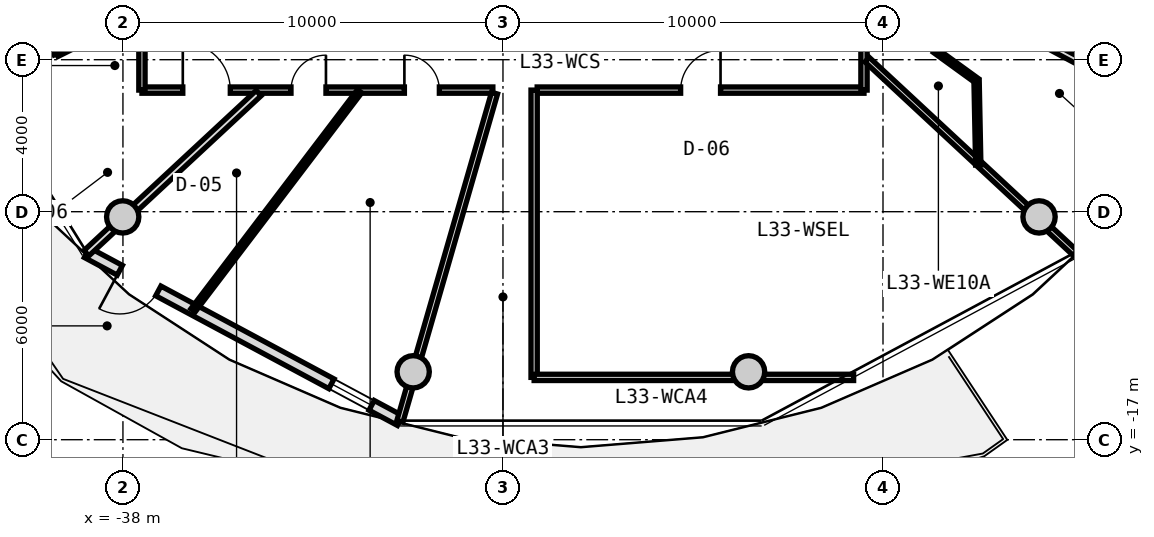
"""IFC4 building model, lengths in metres.
Left out: names, types, materials, properties, quantities, classifications, styles, units other than length and angle.
Written with IfcOpenShell. Run it as: python <this file> out.ifc"""

import sys

from ifc_helpers import new_model, si_unit, direction, frame, frame_2d, origin, origin_2d, place, context, subcontext, project, spatial, rectangle, circle, extrude, source, transform, mapped, element, fill, save


model = new_model("IFC4")
c1 = context("Model", 3, precision=1e-05, world=origin(), true_north=direction((0.0, 1.0)))
c2 = subcontext(c1, "Body", "Model", "MODEL_VIEW")
j1 = project(units=[si_unit("LENGTHUNIT", "METRE"), si_unit("PLANEANGLEUNIT", "RADIAN")], contexts=[c1])
p1 = place(None, origin())
s1 = spatial("IfcSite", under=j1, at=p1, CompositionType="ELEMENT")
p2 = place(p1, origin())
s2 = spatial("IfcBuilding", under=s1, at=p2, CompositionType="ELEMENT")
p3 = place(p2, frame((0.0, 0.0, 108.45)))
s3 = spatial("IfcBuildingStorey", under=s2, at=p3, CompositionType="ELEMENT", Elevation=108.45)
m1 = source(origin(), c2, "Body", "SweptSolid", [
    extrude(circle(Radius=0.425, at=origin_2d()), origin(), (0.0, 0.0, 1.0), 3.05),
])
for number, where, z_axis, x_axis in (
    (1, (-38.006, -11.137, 0.0), (0.0, 0.0, 1.0), (1.0, 0.0, 0.0)),
    (2, (-30.363, -15.213, 0.0), (0.0, 0.0, 1.0), (1.0, 0.0, 0.0)),
    (3, (-21.537, -15.213, 0.0), (0.0, 0.0, 1.0), (1.0, 0.0, 0.0)),
    (4, (-13.894, -11.137, 0.0), (0.0, 0.0, 1.0), (1.0, 0.0, 0.0)),
):
    element("IfcColumn", number, at=place(p3, frame(where, z_axis=z_axis, x_axis=x_axis)), inside=s3, PredefinedType="COLUMN", context=c2, shape_type="MappedRepresentation", body=[
        mapped(m1, transform((0.0, 0.0, 0.0), x_axis=(1.0, 0.0, 0.0), y_axis=(0.0, 1.0, 0.0), z_axis=(0.0, 0.0, 1.0), scale=1.0)),
    ])
m2 = source(origin(), c2, "Body", "SweptSolid", [
    extrude(rectangle(XDim=9.351, YDim=0.29, at=frame_2d((4.675, 0.0))), origin(), (0.0, 0.0, 1.0), 2.79),
])
p4 = place(p3, frame((-30.707, -16.498, 0.0), z_axis=(0.0, 0.0, 1.0), x_axis=(-0.881184411073, 0.472772708267, 0.0)))
e5 = element("IfcWall", 5, at=p4, inside=s3, PredefinedType="SOLIDWALL", context=c2, shape_type="MappedRepresentation", body=[
    mapped(m2, transform((0.0, 0.0, 0.0), x_axis=(1.0, 0.0, 0.0), y_axis=(0.0, 1.0, 0.0), z_axis=(0.0, 0.0, 1.0), scale=1.0)),
])
p5 = place(p4, frame((7.22, 0.0, 0.0)))
e6 = element("IfcOpeningElement", 6, at=p5, cuts=e5, PredefinedType="OPENING", context=c2, shape_type="SweptSolid", body=[
    extrude(rectangle(XDim=1.15, YDim=2.25, at=frame_2d((0.575, 1.125))), frame((0.0, 0.155, 0.0), z_axis=(0.0, -1.0, 0.0), x_axis=(1.0, 0.0, 0.0)), (0.0, 0.0, 1.0), 0.31),
])
p6 = place(p4, frame((0.85, 0.0, 0.85)))
e7 = element("IfcOpeningElement", 7, at=p6, cuts=e5, PredefinedType="OPENING", context=c2, shape_type="SweptSolid", body=[
    extrude(rectangle(XDim=1.2, YDim=1.5, at=frame_2d((0.6, 0.75))), frame((0.0, 0.155, 0.0), z_axis=(0.0, -1.0, 0.0), x_axis=(1.0, 0.0, 0.0)), (0.0, 0.0, 1.0), 0.31),
])
m3 = source(origin(), c2, "Body", "SweptSolid", [
    extrude(rectangle(XDim=8.6, YDim=0.165, at=frame_2d((4.3, 0.0))), origin(), (0.0, 0.0, 1.0), 2.775),
])
p7 = place(p3, frame((-18.5, -7.8, 0.0), z_axis=(0.0, 0.0, 1.0), x_axis=(-1.0, 0.0, 0.0)))
e8 = element("IfcWall", 8, at=p7, inside=s3, PredefinedType="PARTITIONING", context=c2, shape_type="MappedRepresentation", body=[
    mapped(m3, transform((0.0, 0.0, 0.0), x_axis=(1.0, 0.0, 0.0), y_axis=(0.0, 1.0, 0.0), z_axis=(0.0, 0.0, 1.0), scale=1.0)),
])
p8 = place(p7, frame((3.775, 0.0, 0.0)))
e9 = element("IfcOpeningElement", 9, at=p8, cuts=e8, PredefinedType="OPENING", context=c2, shape_type="SweptSolid", body=[
    extrude(rectangle(XDim=1.05, YDim=2.15, at=frame_2d((0.525, 1.075))), frame((0.0, 0.093, 0.0), z_axis=(0.0, -1.0, 0.0), x_axis=(1.0, 0.0, 0.0)), (0.0, 0.0, 1.0), 0.185),
])
m4 = source(origin(), c2, "Body", "SweptSolid", [
    extrude(rectangle(XDim=9.234, YDim=0.165, at=frame_2d((4.617, 0.0))), origin(), (0.0, 0.0, 1.0), 2.775),
])
p9 = place(p3, frame((-28.266, -7.8, 0.0), z_axis=(0.0, 0.0, 1.0), x_axis=(-1.0, 0.0, 0.0)))
e10 = element("IfcWall", 10, at=p9, inside=s3, PredefinedType="PARTITIONING", context=c2, shape_type="MappedRepresentation", body=[
    mapped(m4, transform((0.0, 0.0, 0.0), x_axis=(1.0, 0.0, 0.0), y_axis=(0.0, 1.0, 0.0), z_axis=(0.0, 0.0, 1.0), scale=1.0)),
])
p10 = place(p9, frame((6.909, 0.0, 0.0)))
e11 = element("IfcOpeningElement", 11, at=p10, cuts=e10, PredefinedType="OPENING", context=c2, shape_type="SweptSolid", body=[
    extrude(rectangle(XDim=1.25, YDim=2.2, at=frame_2d((0.625, 1.1))), frame((0.0, 0.093, 0.0), z_axis=(0.0, -1.0, 0.0), x_axis=(1.0, 0.0, 0.0)), (0.0, 0.0, 1.0), 0.185),
])
p11 = place(p9, frame((4.392, 0.0, 0.0)))
e12 = element("IfcOpeningElement", 12, at=p11, cuts=e10, PredefinedType="OPENING", context=c2, shape_type="SweptSolid", body=[
    extrude(rectangle(XDim=0.92, YDim=2.1, at=frame_2d((0.46, 1.05))), frame((0.0, 0.093, 0.0), z_axis=(0.0, -1.0, 0.0), x_axis=(1.0, 0.0, 0.0)), (0.0, 0.0, 1.0), 0.185),
])
p12 = place(p9, frame((1.408, 0.0, 0.0)))
e13 = element("IfcOpeningElement", 13, at=p12, cuts=e10, PredefinedType="OPENING", context=c2, shape_type="SweptSolid", body=[
    extrude(rectangle(XDim=0.92, YDim=2.1, at=frame_2d((0.46, 1.05))), frame((0.0, 0.093, 0.0), z_axis=(0.0, -1.0, 0.0), x_axis=(1.0, 0.0, 0.0)), (0.0, 0.0, 1.0), 0.185),
])
m5 = source(origin(), c2, "Body", "SweptSolid", [
    extrude(rectangle(XDim=15.6, YDim=0.165, at=frame_2d((7.8, 0.0))), origin(), (0.0, 0.0, 1.0), 2.775),
])
p13 = place(p3, frame((-37.5, -7.8, 0.0), z_axis=(0.0, 0.0, 1.0), x_axis=(0.0, 1.0, 0.0)))
e14 = element("IfcWall", 14, at=p13, inside=s3, PredefinedType="PARTITIONING", context=c2, shape_type="MappedRepresentation", body=[
    mapped(m5, transform((0.0, 0.0, 0.0), x_axis=(1.0, 0.0, 0.0), y_axis=(0.0, 1.0, 0.0), z_axis=(0.0, 0.0, 1.0), scale=1.0)),
])
p14 = place(p13, frame((11.994, 0.0, 0.0)))
e15 = element("IfcOpeningElement", 15, at=p14, cuts=e14, PredefinedType="OPENING", context=c2, shape_type="SweptSolid", body=[
    extrude(rectangle(XDim=1.25, YDim=2.2, at=frame_2d((0.625, 1.1))), frame((0.0, 0.093, 0.0), z_axis=(0.0, -1.0, 0.0), x_axis=(1.0, 0.0, 0.0)), (0.0, 0.0, 1.0), 0.185),
])
p15 = place(p13, frame((7.984, 0.0, 0.0)))
e16 = element("IfcOpeningElement", 16, at=p15, cuts=e14, PredefinedType="OPENING", context=c2, shape_type="SweptSolid", body=[
    extrude(rectangle(XDim=1.05, YDim=2.15, at=frame_2d((0.525, 1.075))), frame((0.0, 0.093, 0.0), z_axis=(0.0, -1.0, 0.0), x_axis=(1.0, 0.0, 0.0)), (0.0, 0.0, 1.0), 0.185),
])
p16 = place(p13, frame((5.777, 0.0, 0.0)))
e17 = element("IfcOpeningElement", 17, at=p16, cuts=e14, PredefinedType="OPENING", context=c2, shape_type="SweptSolid", body=[
    extrude(rectangle(XDim=1.05, YDim=2.15, at=frame_2d((0.525, 1.075))), frame((0.0, 0.093, 0.0), z_axis=(0.0, -1.0, 0.0), x_axis=(1.0, 0.0, 0.0)), (0.0, 0.0, 1.0), 0.185),
])
p17 = place(p3, frame((-18.5, 7.8, 0.0), z_axis=(0.0, 0.0, 1.0), x_axis=(0.0, -1.0, 0.0)))
e18 = element("IfcWall", 18, at=p17, inside=s3, PredefinedType="PARTITIONING", context=c2, shape_type="MappedRepresentation", body=[
    mapped(m5, transform((0.0, 0.0, 0.0), x_axis=(1.0, 0.0, 0.0), y_axis=(0.0, 1.0, 0.0), z_axis=(0.0, 0.0, 1.0), scale=1.0)),
])
p18 = place(p17, frame((12.002, 0.0, 0.0)))
e19 = element("IfcOpeningElement", 19, at=p18, cuts=e18, PredefinedType="OPENING", context=c2, shape_type="SweptSolid", body=[
    extrude(rectangle(XDim=1.05, YDim=2.15, at=frame_2d((0.525, 1.075))), frame((0.0, 0.093, 0.0), z_axis=(0.0, -1.0, 0.0), x_axis=(1.0, 0.0, 0.0)), (0.0, 0.0, 1.0), 0.185),
])
p19 = place(p17, frame((10.211, 0.0, 0.0)))
e20 = element("IfcOpeningElement", 20, at=p19, cuts=e18, PredefinedType="OPENING", context=c2, shape_type="SweptSolid", body=[
    extrude(rectangle(XDim=1.05, YDim=2.15, at=frame_2d((0.525, 1.075))), frame((0.0, 0.093, 0.0), z_axis=(0.0, -1.0, 0.0), x_axis=(1.0, 0.0, 0.0)), (0.0, 0.0, 1.0), 0.185),
])
p20 = place(p17, frame((7.722, 0.0, 0.0)))
e21 = element("IfcOpeningElement", 21, at=p20, cuts=e18, PredefinedType="OPENING", context=c2, shape_type="SweptSolid", body=[
    extrude(rectangle(XDim=1.05, YDim=2.15, at=frame_2d((0.525, 1.075))), frame((0.0, 0.093, 0.0), z_axis=(0.0, -1.0, 0.0), x_axis=(1.0, 0.0, 0.0)), (0.0, 0.0, 1.0), 0.185),
])
p21 = place(p17, frame((6.291, 0.0, 0.0)))
e22 = element("IfcOpeningElement", 22, at=p21, cuts=e18, PredefinedType="OPENING", context=c2, shape_type="SweptSolid", body=[
    extrude(rectangle(XDim=1.05, YDim=2.15, at=frame_2d((0.525, 1.075))), frame((0.0, 0.093, 0.0), z_axis=(0.0, -1.0, 0.0), x_axis=(1.0, 0.0, 0.0)), (0.0, 0.0, 1.0), 0.185),
])
p22 = place(p17, frame((2.465, 0.0, 0.0)))
e23 = element("IfcOpeningElement", 23, at=p22, cuts=e18, PredefinedType="OPENING", context=c2, shape_type="SweptSolid", body=[
    extrude(rectangle(XDim=1.25, YDim=2.2, at=frame_2d((0.625, 1.1))), frame((0.0, 0.093, 0.0), z_axis=(0.0, -1.0, 0.0), x_axis=(1.0, 0.0, 0.0)), (0.0, 0.0, 1.0), 0.185),
])
m6 = source(origin(), c2, "Body", "SweptSolid", [
    extrude(rectangle(XDim=8.989, YDim=0.165, at=frame_2d((4.495, 0.0))), origin(), (0.0, 0.0, 1.0), 2.275),
])
p23 = place(p3, frame((-28.222, -7.88, 0.0), z_axis=(0.0, 0.0, 1.0), x_axis=(-0.27702323008, -0.960863221274, 0.0)))
e24 = element("IfcWall", 24, at=p23, inside=s3, PredefinedType="PARTITIONING", context=c2, shape_type="MappedRepresentation", body=[
    mapped(m6, transform((0.0, 0.0, 0.0), x_axis=(1.0, 0.0, 0.0), y_axis=(0.0, 1.0, 0.0), z_axis=(0.0, 0.0, 1.0), scale=1.0)),
])
m7 = source(origin(), c2, "Body", "SweptSolid", [
    extrude(rectangle(XDim=7.482, YDim=0.165, at=frame_2d((3.741, 0.0))), origin(), (0.0, 0.0, 1.0), 2.275),
])
p24 = place(p3, frame((-18.42, -6.998, 0.0), z_axis=(0.0, 0.0, 1.0), x_axis=(0.732508698043, -0.680757671489, 0.0)))
e25 = element("IfcWall", 25, at=p24, inside=s3, PredefinedType="PARTITIONING", context=c2, shape_type="MappedRepresentation", body=[
    mapped(m7, transform((0.0, 0.0, 0.0), x_axis=(1.0, 0.0, 0.0), y_axis=(0.0, 1.0, 0.0), z_axis=(0.0, 0.0, 1.0), scale=1.0)),
])
m8 = source(origin(), c2, "Body", "SweptSolid", [
    extrude(rectangle(XDim=7.56, YDim=0.165, at=frame_2d((3.78, 0.0))), origin(), (0.0, 0.0, 1.0), 2.775),
])
p25 = place(p3, frame((-27.18, -15.36, 0.0), z_axis=(0.0, 0.0, 1.0), x_axis=(0.0, 1.0, 0.0)))
e26 = element("IfcWall", 26, at=p25, inside=s3, PredefinedType="PARTITIONING", context=c2, shape_type="MappedRepresentation", body=[
    mapped(m8, transform((0.0, 0.0, 0.0), x_axis=(1.0, 0.0, 0.0), y_axis=(0.0, 1.0, 0.0), z_axis=(0.0, 0.0, 1.0), scale=1.0)),
])
m9 = source(origin(), c2, "Body", "SweptSolid", [
    extrude(rectangle(XDim=8.407, YDim=0.165, at=frame_2d((4.204, 0.0))), origin(), (0.0, 0.0, 1.0), 2.275),
])
p26 = place(p3, frame((-27.18, -15.36, 0.0), z_axis=(0.0, 0.0, 1.0), x_axis=(1.0, 0.0, 0.0)))
e27 = element("IfcWall", 27, at=p26, inside=s3, PredefinedType="PARTITIONING", context=c2, shape_type="MappedRepresentation", body=[
    mapped(m9, transform((0.0, 0.0, 0.0), x_axis=(1.0, 0.0, 0.0), y_axis=(0.0, 1.0, 0.0), z_axis=(0.0, 0.0, 1.0), scale=1.0)),
])
m10 = source(origin(), c2, "Body", "SweptSolid", [
    extrude(rectangle(XDim=6.187, YDim=0.19, at=frame_2d((3.093, 0.0))), origin(), (0.0, 0.0, 1.0), 2.275),
])
p27 = place(p3, frame((-34.429, -7.88, 0.0), z_axis=(0.0, 0.0, 1.0), x_axis=(-0.732501077882, -0.680765870841, 0.0)))
e28 = element("IfcWall", 28, at=p27, inside=s3, PredefinedType="PARTITIONING", context=c2, shape_type="MappedRepresentation", body=[
    mapped(m10, transform((0.0, 0.0, 0.0), x_axis=(1.0, 0.0, 0.0), y_axis=(0.0, 1.0, 0.0), z_axis=(0.0, 0.0, 1.0), scale=1.0)),
])
m11 = source(origin(), c2, "Body", "SweptSolid", [
    extrude(rectangle(XDim=2.469, YDim=0.14, at=frame_2d((1.235, 0.0))), origin(), (0.0, 0.0, 1.0), 2.775),
])
p28 = place(p3, frame((-37.53, -5.754, 0.0), z_axis=(0.0, 0.0, 1.0), x_axis=(-0.895512172456, -0.445037019789, 0.0)))
e29 = element("IfcWall", 29, at=p28, inside=s3, PredefinedType="PARTITIONING", context=c2, shape_type="MappedRepresentation", body=[
    mapped(m11, transform((0.0, 0.0, 0.0), x_axis=(1.0, 0.0, 0.0), y_axis=(0.0, 1.0, 0.0), z_axis=(0.0, 0.0, 1.0), scale=1.0)),
])
m12 = source(origin(), c2, "Body", "SweptSolid", [
    extrude(rectangle(XDim=3.314, YDim=0.14, at=frame_2d((1.657, 0.0))), origin(), (0.0, 0.0, 1.0), 2.775),
])
p29 = place(p3, frame((-39.741, -6.853, 0.0), z_axis=(0.0, 0.0, 1.0), x_axis=(-0.338067217654, 0.941121966776, 0.0)))
e30 = element("IfcWall", 30, at=p29, inside=s3, PredefinedType="PARTITIONING", context=c2, shape_type="MappedRepresentation", body=[
    mapped(m12, transform((0.0, 0.0, 0.0), x_axis=(1.0, 0.0, 0.0), y_axis=(0.0, 1.0, 0.0), z_axis=(0.0, 0.0, 1.0), scale=1.0)),
])
p30 = place(p29, frame((1.197, 0.0, 0.0)))
e31 = element("IfcOpeningElement", 31, at=p30, cuts=e30, PredefinedType="OPENING", context=c2, shape_type="SweptSolid", body=[
    extrude(rectangle(XDim=0.92, YDim=2.1, at=frame_2d((0.46, 1.05))), frame((0.0, 0.08, 0.0), z_axis=(0.0, -1.0, 0.0), x_axis=(1.0, 0.0, 0.0)), (0.0, 0.0, 1.0), 0.16),
])
m13 = source(origin(), c2, "Body", "SweptSolid", [
    extrude(rectangle(XDim=7.243, YDim=0.14, at=frame_2d((3.621, 0.0))), origin(), (0.0, 0.0, 1.0), 2.775),
])
p31 = place(p3, frame((-31.774, -7.83, 0.0), z_axis=(0.0, 0.0, 1.0), x_axis=(-0.605111472002, -0.796140757939, 0.0)))
e32 = element("IfcWall", 32, at=p31, inside=s3, PredefinedType="PARTITIONING", context=c2, shape_type="MappedRepresentation", body=[
    mapped(m13, transform((0.0, 0.0, 0.0), x_axis=(1.0, 0.0, 0.0), y_axis=(0.0, 1.0, 0.0), z_axis=(0.0, 0.0, 1.0), scale=1.0)),
])
m14 = source(origin(), c2, "Body", "SweptSolid", [
    extrude(rectangle(XDim=8.744, YDim=0.19, at=frame_2d((4.372, 0.0))), origin(), (0.0, 0.0, 1.0), 2.775),
])
p32 = place(p3, frame((-18.273, -4.142, 0.0), z_axis=(0.0, 0.0, 1.0), x_axis=(0.882252449936, -0.470776607938, 0.0)))
e33 = element("IfcWall", 33, at=p32, inside=s3, PredefinedType="PARTITIONING", context=c2, shape_type="MappedRepresentation", body=[
    mapped(m14, transform((0.0, 0.0, 0.0), x_axis=(1.0, 0.0, 0.0), y_axis=(0.0, 1.0, 0.0), z_axis=(0.0, 0.0, 1.0), scale=1.0)),
])
m15 = source(origin(), c2, "Body", "SweptSolid", [
    extrude(rectangle(XDim=3.621, YDim=0.14, at=frame_2d((1.811, 0.0))), origin(), (0.0, 0.0, 1.0), 2.775),
])
p33 = place(p3, frame((-18.47, -5.422, 0.0), z_axis=(0.0, 0.0, 1.0), x_axis=(0.80968252222, -0.586868139544, 0.0)))
e34 = element("IfcWall", 34, at=p33, inside=s3, PredefinedType="PARTITIONING", context=c2, shape_type="MappedRepresentation", body=[
    mapped(m15, transform((0.0, 0.0, 0.0), x_axis=(1.0, 0.0, 0.0), y_axis=(0.0, 1.0, 0.0), z_axis=(0.0, 0.0, 1.0), scale=1.0)),
])
p34 = place(p33, frame((1.351, 0.0, 0.0)))
e35 = element("IfcOpeningElement", 35, at=p34, cuts=e34, PredefinedType="OPENING", context=c2, shape_type="SweptSolid", body=[
    extrude(rectangle(XDim=0.92, YDim=2.1, at=frame_2d((0.46, 1.05))), frame((0.0, 0.08, 0.0), z_axis=(0.0, -1.0, 0.0), x_axis=(1.0, 0.0, 0.0)), (0.0, 0.0, 1.0), 0.16),
])
m16 = source(origin(), c2, "Body", "SweptSolid", [
    extrude(rectangle(XDim=2.225, YDim=0.14, at=frame_2d((1.112, 0.0))), origin(), (0.0, 0.0, 1.0), 2.775),
])
p35 = place(p3, frame((-15.538, -7.547, 0.0), z_axis=(0.0, 0.0, 1.0), x_axis=(0.019971869027, -0.999800542332, 0.0)))
e36 = element("IfcWall", 36, at=p35, inside=s3, PredefinedType="PARTITIONING", context=c2, shape_type="MappedRepresentation", body=[
    mapped(m16, transform((0.0, 0.0, 0.0), x_axis=(1.0, 0.0, 0.0), y_axis=(0.0, 1.0, 0.0), z_axis=(0.0, 0.0, 1.0), scale=1.0)),
])
m17 = source(origin(), c2, "Body", "SweptSolid", [
    extrude(rectangle(XDim=1.15, YDim=2.25, at=frame_2d((0.575, 1.125))), frame((0.0, 0.025, 0.0), z_axis=(0.0, -1.0, 0.0), x_axis=(1.0, 0.0, 0.0)), (0.0, 0.0, 1.0), 0.05),
])
p36 = place(p5, origin())
e37 = element("IfcDoor", 37, at=p36, inside=s3, OperationType="SINGLE_SWING_RIGHT", PredefinedType="DOOR", context=c2, shape_type="MappedRepresentation", body=[
    mapped(m17, transform((0.0, 0.0, 0.0), x_axis=(1.0, 0.0, 0.0), y_axis=(0.0, 1.0, 0.0), z_axis=(0.0, 0.0, 1.0), scale=1.0)),
])
fill(e6, e37)
m18 = source(origin(), c2, "Body", "SweptSolid", [
    extrude(rectangle(XDim=1.2, YDim=1.5, at=frame_2d((0.6, 0.75))), frame((0.0, 0.03, 0.0), z_axis=(0.0, -1.0, 0.0), x_axis=(1.0, 0.0, 0.0)), (0.0, 0.0, 1.0), 0.06),
])
p37 = place(p6, origin())
e38 = element("IfcWindow", 38, at=p37, inside=s3, PartitioningType="SINGLE_PANEL", PredefinedType="WINDOW", context=c2, shape_type="MappedRepresentation", body=[
    mapped(m18, transform((0.0, 0.0, 0.0), x_axis=(1.0, 0.0, 0.0), y_axis=(0.0, 1.0, 0.0), z_axis=(0.0, 0.0, 1.0), scale=1.0)),
])
fill(e7, e38)
m19 = source(origin(), c2, "Body", "SweptSolid", [
    extrude(rectangle(XDim=1.05, YDim=2.15, at=frame_2d((0.525, 1.075))), frame((0.0, 0.025, 0.0), z_axis=(0.0, -1.0, 0.0), x_axis=(1.0, 0.0, 0.0)), (0.0, 0.0, 1.0), 0.05),
])
p38 = place(p8, frame((1.05, 0.0, 0.0), z_axis=(0.0, 0.0, 1.0), x_axis=(-1.0, 0.0, 0.0)))
e39 = element("IfcDoor", 39, at=p38, inside=s3, OperationType="SINGLE_SWING_RIGHT", PredefinedType="DOOR", context=c2, shape_type="MappedRepresentation", body=[
    mapped(m19, transform((0.0, 0.0, 0.0), x_axis=(1.0, 0.0, 0.0), y_axis=(0.0, 1.0, 0.0), z_axis=(0.0, 0.0, 1.0), scale=1.0)),
])
fill(e9, e39)
m20 = source(origin(), c2, "Body", "SweptSolid", [
    extrude(rectangle(XDim=1.25, YDim=2.2, at=frame_2d((0.625, 1.1))), frame((0.0, 0.025, 0.0), z_axis=(0.0, -1.0, 0.0), x_axis=(1.0, 0.0, 0.0)), (0.0, 0.0, 1.0), 0.05),
])
p39 = place(p10, frame((1.25, 0.0, 0.0), z_axis=(0.0, 0.0, 1.0), x_axis=(-1.0, 0.0, 0.0)))
e40 = element("IfcDoor", 40, at=p39, inside=s3, OperationType="SINGLE_SWING_LEFT", PredefinedType="DOOR", context=c2, shape_type="MappedRepresentation", body=[
    mapped(m20, transform((0.0, 0.0, 0.0), x_axis=(1.0, 0.0, 0.0), y_axis=(0.0, 1.0, 0.0), z_axis=(0.0, 0.0, 1.0), scale=1.0)),
])
fill(e11, e40)
m21 = source(origin(), c2, "Body", "SweptSolid", [
    extrude(rectangle(XDim=0.92, YDim=2.1, at=frame_2d((0.46, 1.05))), frame((0.0, 0.025, 0.0), z_axis=(0.0, -1.0, 0.0), x_axis=(1.0, 0.0, 0.0)), (0.0, 0.0, 1.0), 0.05),
])
p40 = place(p11, frame((0.92, 0.0, 0.0), z_axis=(0.0, 0.0, 1.0), x_axis=(-1.0, 0.0, 0.0)))
e41 = element("IfcDoor", 41, at=p40, inside=s3, OperationType="SINGLE_SWING_RIGHT", PredefinedType="DOOR", context=c2, shape_type="MappedRepresentation", body=[
    mapped(m21, transform((0.0, 0.0, 0.0), x_axis=(1.0, 0.0, 0.0), y_axis=(0.0, 1.0, 0.0), z_axis=(0.0, 0.0, 1.0), scale=1.0)),
])
fill(e12, e41)
p41 = place(p12, frame((0.92, 0.0, 0.0), z_axis=(0.0, 0.0, 1.0), x_axis=(-1.0, 0.0, 0.0)))
e42 = element("IfcDoor", 42, at=p41, inside=s3, OperationType="SINGLE_SWING_LEFT", PredefinedType="DOOR", context=c2, shape_type="MappedRepresentation", body=[
    mapped(m21, transform((0.0, 0.0, 0.0), x_axis=(1.0, 0.0, 0.0), y_axis=(0.0, 1.0, 0.0), z_axis=(0.0, 0.0, 1.0), scale=1.0)),
])
fill(e13, e42)
save(model, sys.argv[1])
